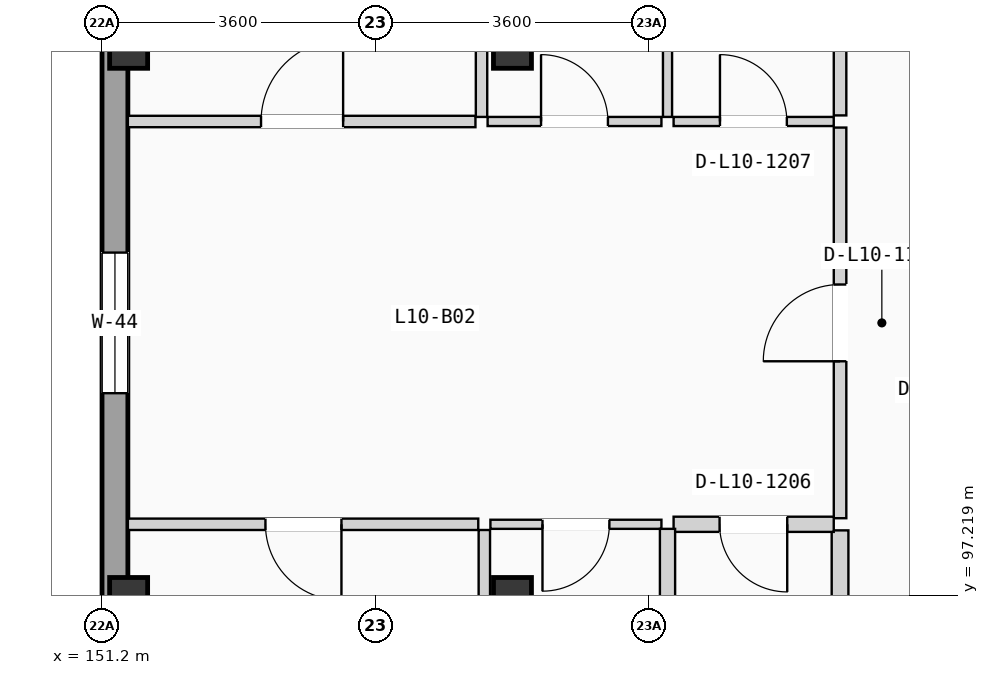
"""IFC4 building model, lengths in metres.
Left out: names, types, materials, properties, quantities, classifications, styles, units other than length and angle.
Written with IfcOpenShell. Run it as: python <this file> out.ifc"""

import sys

from ifc_helpers import new_model, si_unit, direction, frame, frame_2d, origin, origin_2d, place, context, subcontext, project, spatial, rectangle, extrude, element, fill, save


model = new_model("IFC4")
c1 = context("Model", 3, precision=1e-05, world=origin(), true_north=direction((0.0, 1.0)))
c2 = subcontext(c1, "Body", "Model", "MODEL_VIEW")
j1 = project(units=[si_unit("LENGTHUNIT", "METRE"), si_unit("PLANEANGLEUNIT", "RADIAN")], contexts=[c1])
p1 = place(None, origin())
s1 = spatial("IfcSite", under=j1, at=p1, CompositionType="ELEMENT")
p2 = place(p1, origin())
s2 = spatial("IfcBuilding", under=s1, at=p2, CompositionType="ELEMENT")
p3 = place(p2, frame((0.0, 0.0, 34.125)))
s3 = spatial("IfcBuildingStorey", under=s2, at=p3, CompositionType="ELEMENT", Elevation=34.125)
for number, where, z_axis, x_axis in (
    (1, (151.55, 97.2, 0.0), (0.0, 0.0, 1.0), (1.0, 0.0, 0.0)),
    (2, (151.55, 104.4, 0.0), (0.0, 0.0, 1.0), (1.0, 0.0, 0.0)),
    (3, (156.6, 97.2, 0.0), (0.0, 0.0, 1.0), (1.0, 0.0, 0.0)),
    (4, (156.6, 104.4, 0.0), (0.0, 0.0, 1.0), (1.0, 0.0, 0.0)),
):
    element("IfcColumn", number, at=place(p3, frame(where, z_axis=z_axis, x_axis=x_axis)), inside=s3, PredefinedType="COLUMN", context=c2, shape_type="SweptSolid", body=[
        extrude(rectangle(XDim=0.5, YDim=0.5, at=origin_2d()), origin(), (0.0, 0.0, 1.0), 3.15),
    ])
p4 = place(p3, frame((151.37, 68.74, 0.0), z_axis=(0.0, 0.0, 1.0), x_axis=(0.0, 1.0, 0.0)))
e5 = element("IfcWall", 5, at=p4, inside=s3, PredefinedType="SOLIDWALL", context=c2, shape_type="SweptSolid", body=[
    extrude(rectangle(XDim=49.72, YDim=0.34, at=frame_2d((24.86, 0.0))), origin(), (0.0, 0.0, 1.0), 2.89),
])
p5 = place(p4, frame((14.9, 0.0, 0.9)))
e6 = element("IfcOpeningElement", 6, at=p5, cuts=e5, PredefinedType="OPENING", context=c2, shape_type="SweptSolid", body=[
    extrude(rectangle(XDim=1.85, YDim=1.2, at=frame_2d((0.925, 0.6))), frame((0.0, 0.18, 0.0), z_axis=(0.0, -1.0, 0.0), x_axis=(1.0, 0.0, 0.0)), (0.0, 0.0, 1.0), 0.36),
])
p6 = place(p4, frame((8.573, 0.0, 0.855)))
e7 = element("IfcOpeningElement", 7, at=p6, cuts=e5, PredefinedType="OPENING", context=c2, shape_type="SweptSolid", body=[
    extrude(rectangle(XDim=1.85, YDim=1.35, at=frame_2d((0.925, 0.675))), frame((0.0, 0.18, 0.0), z_axis=(0.0, -1.0, 0.0), x_axis=(1.0, 0.0, 0.0)), (0.0, 0.0, 1.0), 0.36),
])
p7 = place(p4, frame((18.31, 0.0, 0.705)))
e8 = element("IfcOpeningElement", 8, at=p7, cuts=e5, PredefinedType="OPENING", context=c2, shape_type="SweptSolid", body=[
    extrude(rectangle(XDim=1.85, YDim=1.5, at=frame_2d((0.925, 0.75))), frame((0.0, 0.18, 0.0), z_axis=(0.0, -1.0, 0.0), x_axis=(1.0, 0.0, 0.0)), (0.0, 0.0, 1.0), 0.36),
])
p8 = place(p4, frame((31.135, 0.0, 0.555)))
e9 = element("IfcOpeningElement", 9, at=p8, cuts=e5, PredefinedType="OPENING", context=c2, shape_type="SweptSolid", body=[
    extrude(rectangle(XDim=1.85, YDim=1.65, at=frame_2d((0.925, 0.825))), frame((0.0, 0.18, 0.0), z_axis=(0.0, -1.0, 0.0), x_axis=(1.0, 0.0, 0.0)), (0.0, 0.0, 1.0), 0.36),
])
p9 = place(p4, frame((24.687, 0.0, 0.85)))
e10 = element("IfcOpeningElement", 10, at=p9, cuts=e5, PredefinedType="OPENING", context=c2, shape_type="SweptSolid", body=[
    extrude(rectangle(XDim=0.95, YDim=1.2, at=frame_2d((0.475, 0.6))), frame((0.0, 0.18, 0.0), z_axis=(0.0, -1.0, 0.0), x_axis=(1.0, 0.0, 0.0)), (0.0, 0.0, 1.0), 0.36),
])
p10 = place(p4, frame((38.195, 0.0, 0.9)))
e11 = element("IfcOpeningElement", 11, at=p10, cuts=e5, PredefinedType="OPENING", context=c2, shape_type="SweptSolid", body=[
    extrude(rectangle(XDim=2.0, YDim=1.2, at=frame_2d((1.0, 0.6))), frame((0.0, 0.18, 0.0), z_axis=(0.0, -1.0, 0.0), x_axis=(1.0, 0.0, 0.0)), (0.0, 0.0, 1.0), 0.36),
])
p11 = place(p3, frame((160.91, 98.23, 0.0), z_axis=(0.0, 0.0, 1.0), x_axis=(0.0, 1.0, 0.0)))
e12 = element("IfcWall", 12, at=p11, inside=s3, PredefinedType="PARTITIONING", context=c2, shape_type="SweptSolid", body=[
    extrude(rectangle(XDim=5.14, YDim=0.165, at=frame_2d((2.57, 0.0))), origin(), (0.0, 0.0, 1.0), 2.87),
])
p12 = place(p11, frame((2.065, 0.0, 0.0)))
e13 = element("IfcOpeningElement", 13, at=p12, cuts=e12, PredefinedType="OPENING", context=c2, shape_type="SweptSolid", body=[
    extrude(rectangle(XDim=1.01, YDim=2.11, at=frame_2d((0.505, 1.055))), frame((0.0, 0.093, 0.0), z_axis=(0.0, -1.0, 0.0), x_axis=(1.0, 0.0, 0.0)), (0.0, 0.0, 1.0), 0.185),
])
p13 = place(p3, frame((160.91, 90.874, 0.0), z_axis=(0.0, 0.0, 1.0), x_axis=(0.0, 1.0, 0.0)))
e14 = element("IfcWall", 14, at=p13, inside=s3, PredefinedType="PLUMBINGWALL", context=c2, shape_type="SweptSolid", body=[
    extrude(rectangle(XDim=7.196, YDim=0.22, at=frame_2d((3.598, 0.0))), origin(), (0.0, 0.0, 1.0), 2.87),
])
p14 = place(p3, frame((160.91, 103.53, 0.0), z_axis=(0.0, 0.0, 1.0), x_axis=(0.0, 1.0, 0.0)))
e15 = element("IfcWall", 15, at=p14, inside=s3, PredefinedType="PARTITIONING", context=c2, shape_type="SweptSolid", body=[
    extrude(rectangle(XDim=7.67, YDim=0.165, at=frame_2d((3.835, 0.0))), origin(), (0.0, 0.0, 1.0), 2.87),
])
p15 = place(p3, frame((158.72, 98.15, 0.0), z_axis=(0.0, 0.0, 1.0), x_axis=(1.0, 0.0, 0.0)))
e16 = element("IfcWall", 16, at=p15, inside=s3, PredefinedType="PLUMBINGWALL", context=c2, shape_type="SweptSolid", body=[
    extrude(rectangle(XDim=2.107, YDim=0.2, at=frame_2d((1.053, 0.0))), origin(), (0.0, 0.0, 1.0), 2.87),
])
p16 = place(p15, frame((0.605, 0.0, 0.0)))
e17 = element("IfcOpeningElement", 17, at=p16, cuts=e16, PredefinedType="OPENING", context=c2, shape_type="SweptSolid", body=[
    extrude(rectangle(XDim=0.89, YDim=2.03, at=frame_2d((0.445, 1.015))), frame((0.0, 0.11, 0.0), z_axis=(0.0, -1.0, 0.0), x_axis=(1.0, 0.0, 0.0)), (0.0, 0.0, 1.0), 0.22),
])
p17 = place(p3, frame((158.72, 103.45, 0.0), z_axis=(0.0, 0.0, 1.0), x_axis=(1.0, 0.0, 0.0)))
e18 = element("IfcWall", 18, at=p17, inside=s3, PredefinedType="PARTITIONING", context=c2, shape_type="SweptSolid", body=[
    extrude(rectangle(XDim=2.107, YDim=0.12, at=frame_2d((1.053, 0.0))), origin(), (0.0, 0.0, 1.0), 2.87),
])
p18 = place(p17, frame((0.61, 0.0, 0.0)))
e19 = element("IfcOpeningElement", 19, at=p18, cuts=e18, PredefinedType="OPENING", context=c2, shape_type="SweptSolid", body=[
    extrude(rectangle(XDim=0.88, YDim=2.02, at=frame_2d((0.44, 1.01))), frame((0.0, 0.07, 0.0), z_axis=(0.0, -1.0, 0.0), x_axis=(1.0, 0.0, 0.0)), (0.0, 0.0, 1.0), 0.14),
])
p19 = place(p3, frame((151.54, 98.15, 0.0), z_axis=(0.0, 0.0, 1.0), x_axis=(1.0, 0.0, 0.0)))
e20 = element("IfcWall", 20, at=p19, inside=s3, PredefinedType="PARTITIONING", context=c2, shape_type="SweptSolid", body=[
    extrude(rectangle(XDim=4.61, YDim=0.15, at=frame_2d((2.305, 0.0))), origin(), (0.0, 0.0, 1.0), 2.87),
])
p20 = place(p19, frame((1.81, 0.0, 0.0)))
e21 = element("IfcOpeningElement", 21, at=p20, cuts=e20, PredefinedType="OPENING", context=c2, shape_type="SweptSolid", body=[
    extrude(rectangle(XDim=1.0, YDim=2.06, at=frame_2d((0.5, 1.03))), frame((0.0, 0.085, 0.0), z_axis=(0.0, -1.0, 0.0), x_axis=(1.0, 0.0, 0.0)), (0.0, 0.0, 1.0), 0.17),
])
p21 = place(p3, frame((156.31, 98.15, 0.0), z_axis=(0.0, 0.0, 1.0), x_axis=(1.0, 0.0, 0.0)))
e22 = element("IfcWall", 22, at=p21, inside=s3, PredefinedType="PARTITIONING", context=c2, shape_type="SweptSolid", body=[
    extrude(rectangle(XDim=2.25, YDim=0.12, at=frame_2d((1.125, 0.0))), origin(), (0.0, 0.0, 1.0), 2.87),
])
p22 = place(p21, frame((0.685, 0.0, 0.0)))
e23 = element("IfcOpeningElement", 23, at=p22, cuts=e22, PredefinedType="OPENING", context=c2, shape_type="SweptSolid", body=[
    extrude(rectangle(XDim=0.88, YDim=2.02, at=frame_2d((0.44, 1.01))), frame((0.0, 0.07, 0.0), z_axis=(0.0, -1.0, 0.0), x_axis=(1.0, 0.0, 0.0)), (0.0, 0.0, 1.0), 0.14),
])
p23 = place(p3, frame((151.54, 103.45, 0.0), z_axis=(0.0, 0.0, 1.0), x_axis=(1.0, 0.0, 0.0)))
e24 = element("IfcWall", 24, at=p23, inside=s3, PredefinedType="PARTITIONING", context=c2, shape_type="SweptSolid", body=[
    extrude(rectangle(XDim=4.573, YDim=0.15, at=frame_2d((2.287, 0.0))), origin(), (0.0, 0.0, 1.0), 2.87),
])
p24 = place(p23, frame((1.752, 0.0, 0.0)))
e25 = element("IfcOpeningElement", 25, at=p24, cuts=e24, PredefinedType="OPENING", context=c2, shape_type="SweptSolid", body=[
    extrude(rectangle(XDim=1.08, YDim=2.1, at=frame_2d((0.54, 1.05))), frame((0.0, 0.085, 0.0), z_axis=(0.0, -1.0, 0.0), x_axis=(1.0, 0.0, 0.0)), (0.0, 0.0, 1.0), 0.17),
])
p25 = place(p3, frame((156.273, 103.45, 0.0), z_axis=(0.0, 0.0, 1.0), x_axis=(1.0, 0.0, 0.0)))
e26 = element("IfcWall", 26, at=p25, inside=s3, PredefinedType="PARTITIONING", context=c2, shape_type="SweptSolid", body=[
    extrude(rectangle(XDim=2.287, YDim=0.12, at=frame_2d((1.144, 0.0))), origin(), (0.0, 0.0, 1.0), 2.87),
])
p26 = place(p25, frame((0.703, 0.0, 0.0)))
e27 = element("IfcOpeningElement", 27, at=p26, cuts=e26, PredefinedType="OPENING", context=c2, shape_type="SweptSolid", body=[
    extrude(rectangle(XDim=0.88, YDim=2.02, at=frame_2d((0.44, 1.01))), frame((0.0, 0.07, 0.0), z_axis=(0.0, -1.0, 0.0), x_axis=(1.0, 0.0, 0.0)), (0.0, 0.0, 1.0), 0.14),
])
p27 = place(p3, frame((158.64, 90.874, 0.0), z_axis=(0.0, 0.0, 1.0), x_axis=(0.0, 1.0, 0.0)))
e28 = element("IfcWall", 28, at=p27, inside=s3, PredefinedType="PLUMBINGWALL", context=c2, shape_type="SweptSolid", body=[
    extrude(rectangle(XDim=7.216, YDim=0.2, at=frame_2d((3.608, 0.0))), origin(), (0.0, 0.0, 1.0), 2.87),
])
p28 = place(p27, frame((3.173, 0.0, 0.0)))
e29 = element("IfcOpeningElement", 29, at=p28, cuts=e28, PredefinedType="OPENING", context=c2, shape_type="SweptSolid", body=[
    extrude(rectangle(XDim=0.85, YDim=2.01, at=frame_2d((0.425, 1.005))), frame((0.0, 0.11, 0.0), z_axis=(0.0, -1.0, 0.0), x_axis=(1.0, 0.0, 0.0)), (0.0, 0.0, 1.0), 0.22),
])
p29 = place(p3, frame((158.64, 103.51, 0.0), z_axis=(0.0, 0.0, 1.0), x_axis=(0.0, 1.0, 0.0)))
e30 = element("IfcWall", 30, at=p29, inside=s3, PredefinedType="PARTITIONING", context=c2, shape_type="SweptSolid", body=[
    extrude(rectangle(XDim=7.69, YDim=0.12, at=frame_2d((3.845, 0.0))), origin(), (0.0, 0.0, 1.0), 2.87),
])
p30 = place(p3, frame((156.23, 90.874, 0.0), z_axis=(0.0, 0.0, 1.0), x_axis=(0.0, 1.0, 0.0)))
e31 = element("IfcWall", 31, at=p30, inside=s3, PredefinedType="PARTITIONING", context=c2, shape_type="SweptSolid", body=[
    extrude(rectangle(XDim=7.201, YDim=0.15, at=frame_2d((3.601, 0.0))), origin(), (0.0, 0.0, 1.0), 2.87),
])
p31 = place(p3, frame((156.193, 103.51, 0.0), z_axis=(0.0, 0.0, 1.0), x_axis=(0.0, 1.0, 0.0)))
e32 = element("IfcWall", 32, at=p31, inside=s3, PredefinedType="PARTITIONING", context=c2, shape_type="SweptSolid", body=[
    extrude(rectangle(XDim=7.69, YDim=0.15, at=frame_2d((3.845, 0.0))), origin(), (0.0, 0.0, 1.0), 2.87),
])
p32 = place(p8, origin())
e33 = element("IfcWindow", 33, at=p32, inside=s3, PartitioningType="DOUBLE_PANEL_VERTICAL", PredefinedType="WINDOW", context=c2, shape_type="SweptSolid", body=[
    extrude(rectangle(XDim=1.85, YDim=1.65, at=frame_2d((0.925, 0.825))), frame((0.0, 0.03, 0.0), z_axis=(0.0, -1.0, 0.0), x_axis=(1.0, 0.0, 0.0)), (0.0, 0.0, 1.0), 0.06),
])
fill(e9, e33)
p33 = place(p12, origin())
e34 = element("IfcDoor", 34, at=p33, inside=s3, OperationType="SINGLE_SWING_LEFT", PredefinedType="DOOR", context=c2, shape_type="SweptSolid", body=[
    extrude(rectangle(XDim=1.01, YDim=2.11, at=frame_2d((0.505, 1.055))), frame((0.0, 0.025, 0.0), z_axis=(0.0, -1.0, 0.0), x_axis=(1.0, 0.0, 0.0)), (0.0, 0.0, 1.0), 0.05),
])
fill(e13, e34)
p34 = place(p16, frame((0.89, 0.0, 0.0), z_axis=(0.0, 0.0, 1.0), x_axis=(-1.0, 0.0, 0.0)))
e35 = element("IfcDoor", 35, at=p34, inside=s3, OperationType="SINGLE_SWING_RIGHT", PredefinedType="DOOR", context=c2, shape_type="SweptSolid", body=[
    extrude(rectangle(XDim=0.89, YDim=2.03, at=frame_2d((0.445, 1.015))), frame((0.0, 0.025, 0.0), z_axis=(0.0, -1.0, 0.0), x_axis=(1.0, 0.0, 0.0)), (0.0, 0.0, 1.0), 0.05),
])
fill(e17, e35)
p35 = place(p18, origin())
e36 = element("IfcDoor", 36, at=p35, inside=s3, OperationType="SINGLE_SWING_LEFT", PredefinedType="DOOR", context=c2, shape_type="SweptSolid", body=[
    extrude(rectangle(XDim=0.88, YDim=2.02, at=frame_2d((0.44, 1.01))), frame((0.0, 0.025, 0.0), z_axis=(0.0, -1.0, 0.0), x_axis=(1.0, 0.0, 0.0)), (0.0, 0.0, 1.0), 0.05),
])
fill(e19, e36)
p36 = place(p20, frame((1.0, 0.0, 0.0), z_axis=(0.0, 0.0, 1.0), x_axis=(-1.0, 0.0, 0.0)))
e37 = element("IfcDoor", 37, at=p36, inside=s3, OperationType="SINGLE_SWING_RIGHT", PredefinedType="DOOR", context=c2, shape_type="SweptSolid", body=[
    extrude(rectangle(XDim=1.0, YDim=2.06, at=frame_2d((0.5, 1.03))), frame((0.0, 0.025, 0.0), z_axis=(0.0, -1.0, 0.0), x_axis=(1.0, 0.0, 0.0)), (0.0, 0.0, 1.0), 0.05),
])
fill(e21, e37)
p37 = place(p22, frame((0.88, 0.0, 0.0), z_axis=(0.0, 0.0, 1.0), x_axis=(-1.0, 0.0, 0.0)))
e38 = element("IfcDoor", 38, at=p37, inside=s3, OperationType="SINGLE_SWING_LEFT", PredefinedType="DOOR", context=c2, shape_type="SweptSolid", body=[
    extrude(rectangle(XDim=0.88, YDim=2.02, at=frame_2d((0.44, 1.01))), frame((0.0, 0.025, 0.0), z_axis=(0.0, -1.0, 0.0), x_axis=(1.0, 0.0, 0.0)), (0.0, 0.0, 1.0), 0.05),
])
fill(e23, e38)
p38 = place(p24, origin())
e39 = element("IfcDoor", 39, at=p38, inside=s3, OperationType="SINGLE_SWING_RIGHT", PredefinedType="DOOR", context=c2, shape_type="SweptSolid", body=[
    extrude(rectangle(XDim=1.08, YDim=2.1, at=frame_2d((0.54, 1.05))), frame((0.0, 0.025, 0.0), z_axis=(0.0, -1.0, 0.0), x_axis=(1.0, 0.0, 0.0)), (0.0, 0.0, 1.0), 0.05),
])
fill(e25, e39)
p39 = place(p26, origin())
e40 = element("IfcDoor", 40, at=p39, inside=s3, OperationType="SINGLE_SWING_LEFT", PredefinedType="DOOR", context=c2, shape_type="SweptSolid", body=[
    extrude(rectangle(XDim=0.88, YDim=2.02, at=frame_2d((0.44, 1.01))), frame((0.0, 0.025, 0.0), z_axis=(0.0, -1.0, 0.0), x_axis=(1.0, 0.0, 0.0)), (0.0, 0.0, 1.0), 0.05),
])
fill(e27, e40)
save(model, sys.argv[1])
